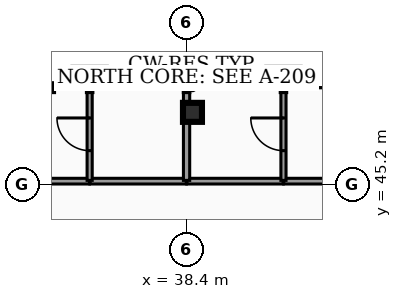
"""IFC4 building model, lengths in metres.
Left out: names, types, materials, properties, quantities, classifications, styles, units other than length and angle.
Written with IfcOpenShell. Run it as: python <this file> out.ifc"""

import sys

from ifc_helpers import new_model, si_unit, direction, frame, frame_2d, origin, origin_2d, place, context, subcontext, project, spatial, rectangle, hollow_rectangle, extrude, element, fill, save


model = new_model("IFC4")
c1 = context("Model", 3, precision=1e-05, world=origin(), true_north=direction((0.0, 1.0)))
c2 = subcontext(c1, "Body", "Model", "MODEL_VIEW")
j1 = project(units=[si_unit("LENGTHUNIT", "METRE"), si_unit("PLANEANGLEUNIT", "RADIAN")], contexts=[c1])
p1 = place(None, origin())
s1 = spatial("IfcSite", under=j1, at=p1, CompositionType="ELEMENT")
p2 = place(p1, origin())
s2 = spatial("IfcBuilding", under=s1, at=p2, CompositionType="ELEMENT")
p3 = place(p2, frame((0.0, 0.0, 268.6)))
s3 = spatial("IfcBuildingStorey", under=s2, at=p3, CompositionType="ELEMENT", Elevation=268.6)
p4 = place(p3, frame((38.555, 47.1, 0.0), z_axis=(0.0, 0.0, 1.0), x_axis=(1.0, 0.0, 0.0)))
e1 = element("IfcColumn", 1, at=p4, inside=s3, PredefinedType="COLUMN", context=c2, shape_type="SweptSolid", body=[
    extrude(hollow_rectangle(XDim=0.5, YDim=0.5, WallThickness=0.025, at=origin_2d()), origin(), (0.0, 0.0, 1.0), 3.18),
])
p5 = place(p3, frame((26.57, 45.29, 0.0), z_axis=(0.0, 0.0, 1.0), x_axis=(1.0, 0.0, 0.0)))
e2 = element("IfcWall", 2, at=p5, inside=s3, PredefinedType="PARTITIONING", context=c2, shape_type="SweptSolid", body=[
    extrude(rectangle(XDim=9.275, YDim=0.15, at=frame_2d((4.637, 0.0))), origin(), (0.0, 0.0, 1.0), 2.235),
])
p6 = place(p3, frame((35.855, 45.29, 0.0), z_axis=(0.0, 0.0, 1.0), x_axis=(1.0, 0.0, 0.0)))
e3 = element("IfcWall", 3, at=p6, inside=s3, PredefinedType="PARTITIONING", context=c2, shape_type="SweptSolid", body=[
    extrude(rectangle(XDim=2.54, YDim=0.15, at=frame_2d((1.27, 0.0))), origin(), (0.0, 0.0, 1.0), 2.235),
])
p7 = place(p3, frame((40.955, 45.29, 0.0), z_axis=(0.0, 0.0, 1.0), x_axis=(1.0, 0.0, 0.0)))
e4 = element("IfcWall", 4, at=p7, inside=s3, PredefinedType="PARTITIONING", context=c2, shape_type="SweptSolid", body=[
    extrude(rectangle(XDim=9.375, YDim=0.15, at=frame_2d((4.688, 0.0))), origin(), (0.0, 0.0, 1.0), 2.235),
])
p8 = place(p3, frame((38.405, 45.29, 0.0), z_axis=(0.0, 0.0, 1.0), x_axis=(1.0, 0.0, 0.0)))
e5 = element("IfcWall", 5, at=p8, inside=s3, PredefinedType="PARTITIONING", context=c2, shape_type="SweptSolid", body=[
    extrude(rectangle(XDim=2.54, YDim=0.15, at=frame_2d((1.27, 0.0))), origin(), (0.0, 0.0, 1.0), 2.235),
])
p9 = place(p3, frame((35.85, 45.31, 0.0), z_axis=(0.0, 0.0, 1.0), x_axis=(0.0, 1.0, 0.0)))
e6 = element("IfcWall", 6, at=p9, inside=s3, PredefinedType="PARTITIONING", context=c2, shape_type="SweptSolid", body=[
    extrude(rectangle(XDim=2.425, YDim=0.135, at=frame_2d((1.212, 0.0))), origin(), (0.0, 0.0, 1.0), 2.235),
])
p10 = place(p9, frame((0.782, 0.0, 0.0)))
e7 = element("IfcOpeningElement", 7, at=p10, cuts=e6, PredefinedType="OPENING", context=c2, shape_type="SweptSolid", body=[
    extrude(rectangle(XDim=0.86, YDim=2.05, at=frame_2d((0.43, 1.025))), frame((0.0, 0.077, 0.0), z_axis=(0.0, -1.0, 0.0), x_axis=(1.0, 0.0, 0.0)), (0.0, 0.0, 1.0), 0.155),
])
p11 = place(p3, frame((38.4, 45.31, 0.0), z_axis=(0.0, 0.0, 1.0), x_axis=(0.0, 1.0, 0.0)))
e8 = element("IfcWall", 8, at=p11, inside=s3, PredefinedType="PARTITIONING", context=c2, shape_type="SweptSolid", body=[
    extrude(rectangle(XDim=2.425, YDim=0.165, at=frame_2d((1.212, 0.0))), origin(), (0.0, 0.0, 1.0), 2.235),
])
p12 = place(p3, frame((40.95, 45.31, 0.0), z_axis=(0.0, 0.0, 1.0), x_axis=(0.0, 1.0, 0.0)))
e9 = element("IfcWall", 9, at=p12, inside=s3, PredefinedType="PARTITIONING", context=c2, shape_type="SweptSolid", body=[
    extrude(rectangle(XDim=2.425, YDim=0.135, at=frame_2d((1.212, 0.0))), origin(), (0.0, 0.0, 1.0), 2.235),
])
p13 = place(p12, frame((0.782, 0.0, 0.0)))
e10 = element("IfcOpeningElement", 10, at=p13, cuts=e9, PredefinedType="OPENING", context=c2, shape_type="SweptSolid", body=[
    extrude(rectangle(XDim=0.86, YDim=2.05, at=frame_2d((0.43, 1.025))), frame((0.0, 0.077, 0.0), z_axis=(0.0, -1.0, 0.0), x_axis=(1.0, 0.0, 0.0)), (0.0, 0.0, 1.0), 0.155),
])
p14 = place(p10, origin())
e11 = element("IfcDoor", 11, at=p14, inside=s3, OperationType="SINGLE_SWING_RIGHT", PredefinedType="DOOR", context=c2, shape_type="SweptSolid", body=[
    extrude(rectangle(XDim=0.86, YDim=2.05, at=frame_2d((0.43, 1.025))), frame((0.0, 0.025, 0.0), z_axis=(0.0, -1.0, 0.0), x_axis=(1.0, 0.0, 0.0)), (0.0, 0.0, 1.0), 0.05),
])
fill(e7, e11)
p15 = place(p13, origin())
e12 = element("IfcDoor", 12, at=p15, inside=s3, OperationType="SINGLE_SWING_RIGHT", PredefinedType="DOOR", context=c2, shape_type="SweptSolid", body=[
    extrude(rectangle(XDim=0.86, YDim=2.05, at=frame_2d((0.43, 1.025))), frame((0.0, 0.025, 0.0), z_axis=(0.0, -1.0, 0.0), x_axis=(1.0, 0.0, 0.0)), (0.0, 0.0, 1.0), 0.05),
])
fill(e10, e12)
save(model, sys.argv[1])
